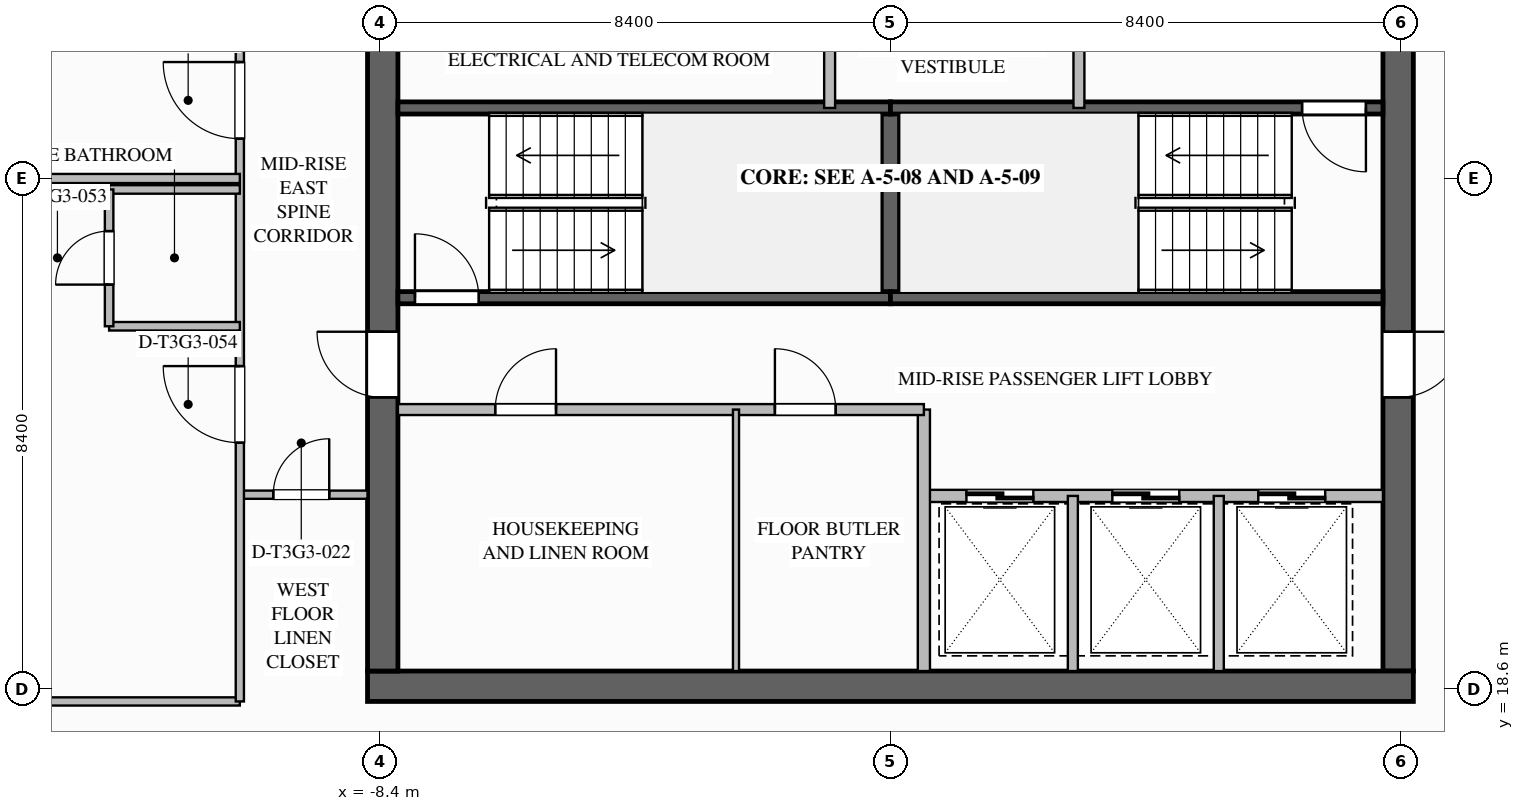
"""IFC4 building model, lengths in metres.
Left out: names, types, materials, properties, quantities, classifications, styles, units other than length and angle.
Written with IfcOpenShell. Run it as: python <this file> out.ifc"""

import sys

from ifc_helpers import new_model, si_unit, direction, frame, frame_2d, origin, place, context, subcontext, project, spatial, rectangle, extrude, element, fill, save


model = new_model("IFC4")
c1 = context("Model", 3, precision=1e-05, world=origin(), true_north=direction((0.0, 1.0)))
c2 = subcontext(c1, "Body", "Model", "MODEL_VIEW")
j1 = project(units=[si_unit("LENGTHUNIT", "METRE"), si_unit("PLANEANGLEUNIT", "RADIAN")], contexts=[c1])
p1 = place(None, origin())
s1 = spatial("IfcSite", under=j1, at=p1, CompositionType="ELEMENT")
p2 = place(p1, origin())
s2 = spatial("IfcBuilding", under=s1, at=p2, CompositionType="ELEMENT")
p3 = place(p2, frame((0.0, 0.0, 171.7)))
s3 = spatial("IfcBuildingStorey", under=s2, at=p3, CompositionType="ELEMENT", Elevation=171.7)
p4 = place(p3, frame((8.35, 35.1, 0.0), z_axis=(0.0, 0.0, 1.0), x_axis=(0.0, -1.0, 0.0)))
e1 = element("IfcWall", 1, at=p4, inside=s3, PredefinedType="SHEAR", context=c2, shape_type="SweptSolid", body=[
    extrude(rectangle(XDim=16.2, YDim=0.5, at=frame_2d((8.1, 0.0))), origin(), (0.0, 0.0, 1.0), 3.55),
])
p5 = place(p4, frame((3.08, 0.0, 0.0)))
e2 = element("IfcOpeningElement", 2, at=p5, cuts=e1, PredefinedType="OPENING", context=c2, shape_type="SweptSolid", body=[
    extrude(rectangle(XDim=1.12, YDim=2.1, at=frame_2d((0.56, 1.05))), frame((0.0, 0.26, 0.0), z_axis=(0.0, -1.0, 0.0), x_axis=(1.0, 0.0, 0.0)), (0.0, 0.0, 1.0), 0.52),
])
p6 = place(p4, frame((10.62, 0.0, 0.0)))
e3 = element("IfcOpeningElement", 3, at=p6, cuts=e1, PredefinedType="OPENING", context=c2, shape_type="SweptSolid", body=[
    extrude(rectangle(XDim=1.08, YDim=2.04, at=frame_2d((0.54, 1.02))), frame((0.0, 0.26, 0.0), z_axis=(0.0, -1.0, 0.0), x_axis=(1.0, 0.0, 0.0)), (0.0, 0.0, 1.0), 0.52),
])
p7 = place(p3, frame((8.6, 18.65, 0.0), z_axis=(0.0, 0.0, 1.0), x_axis=(-1.0, 0.0, 0.0)))
e4 = element("IfcWall", 4, at=p7, inside=s3, PredefinedType="SHEAR", context=c2, shape_type="SweptSolid", body=[
    extrude(rectangle(XDim=17.2, YDim=0.5, at=frame_2d((8.6, 0.0))), origin(), (0.0, 0.0, 1.0), 3.55),
])
p8 = place(p3, frame((-8.35, 18.9, 0.0), z_axis=(0.0, 0.0, 1.0), x_axis=(0.0, 1.0, 0.0)))
e5 = element("IfcWall", 5, at=p8, inside=s3, PredefinedType="SHEAR", context=c2, shape_type="SweptSolid", body=[
    extrude(rectangle(XDim=16.2, YDim=0.5, at=frame_2d((8.1, 0.0))), origin(), (0.0, 0.0, 1.0), 3.55),
])
p9 = place(p8, frame((12.02, 0.0, 0.0)))
e6 = element("IfcOpeningElement", 6, at=p9, cuts=e5, PredefinedType="OPENING", context=c2, shape_type="SweptSolid", body=[
    extrude(rectangle(XDim=1.08, YDim=2.04, at=frame_2d((0.54, 1.02))), frame((0.0, 0.26, 0.0), z_axis=(0.0, -1.0, 0.0), x_axis=(1.0, 0.0, 0.0)), (0.0, 0.0, 1.0), 0.52),
])
p10 = place(p8, frame((4.5, 0.0, 0.0)))
e7 = element("IfcOpeningElement", 7, at=p10, cuts=e5, PredefinedType="OPENING", context=c2, shape_type="SweptSolid", body=[
    extrude(rectangle(XDim=1.08, YDim=2.04, at=frame_2d((0.54, 1.02))), frame((0.0, 0.26, 0.0), z_axis=(0.0, -1.0, 0.0), x_axis=(1.0, 0.0, 0.0)), (0.0, 0.0, 1.0), 0.52),
])
p11 = place(p3, frame((0.0, 25.04, 0.0), z_axis=(0.0, 0.0, 1.0), x_axis=(0.0, 1.0, 0.0)))
e8 = element("IfcWall", 8, at=p11, inside=s3, PredefinedType="SOLIDWALL", context=c2, shape_type="SweptSolid", body=[
    extrude(rectangle(XDim=3.12, YDim=0.3, at=frame_2d((1.56, 0.0))), origin(), (0.0, 0.0, 1.0), 3.29),
])
p12 = place(p3, frame((-8.1, 25.04, 0.0), z_axis=(0.0, 0.0, 1.0), x_axis=(1.0, 0.0, 0.0)))
e9 = element("IfcWall", 9, at=p12, inside=s3, PredefinedType="SOLIDWALL", context=c2, shape_type="SweptSolid", body=[
    extrude(rectangle(XDim=8.1, YDim=0.2, at=frame_2d((4.05, 0.0))), origin(), (0.0, 0.0, 1.0), 3.29),
])
p13 = place(p12, frame((0.28, 0.0, 0.0)))
e10 = element("IfcOpeningElement", 10, at=p13, cuts=e9, PredefinedType="OPENING", context=c2, shape_type="SweptSolid", body=[
    extrude(rectangle(XDim=1.05, YDim=2.1, at=frame_2d((0.525, 1.05))), frame((0.0, 0.11, 0.0), z_axis=(0.0, -1.0, 0.0), x_axis=(1.0, 0.0, 0.0)), (0.0, 0.0, 1.0), 0.22),
])
for number, where, z_axis, x_axis in (
    (11, (-8.1, 28.16, 0.0), (0.0, 0.0, 1.0), (1.0, 0.0, 0.0)),
    (12, (0.0, 25.04, 0.0), (0.0, 0.0, 1.0), (1.0, 0.0, 0.0)),
):
    element("IfcWall", number, at=place(p3, frame(where, z_axis=z_axis, x_axis=x_axis)), inside=s3, PredefinedType="SOLIDWALL", context=c2, shape_type="SweptSolid", body=[
        extrude(rectangle(XDim=8.1, YDim=0.2, at=frame_2d((4.05, 0.0))), origin(), (0.0, 0.0, 1.0), 3.29),
    ])
p14 = place(p3, frame((8.1, 28.16, 0.0), z_axis=(0.0, 0.0, 1.0), x_axis=(-1.0, 0.0, 0.0)))
e13 = element("IfcWall", 13, at=p14, inside=s3, PredefinedType="SOLIDWALL", context=c2, shape_type="SweptSolid", body=[
    extrude(rectangle(XDim=8.1, YDim=0.2, at=frame_2d((4.05, 0.0))), origin(), (0.0, 0.0, 1.0), 3.29),
])
p15 = place(p14, frame((0.28, 0.0, 0.0)))
e14 = element("IfcOpeningElement", 14, at=p15, cuts=e13, PredefinedType="OPENING", context=c2, shape_type="SweptSolid", body=[
    extrude(rectangle(XDim=1.05, YDim=2.1, at=frame_2d((0.525, 1.05))), frame((0.0, 0.11, 0.0), z_axis=(0.0, -1.0, 0.0), x_axis=(1.0, 0.0, 0.0)), (0.0, 0.0, 1.0), 0.22),
])
p16 = place(p3, frame((3.1, 28.16, 0.0), z_axis=(0.0, 0.0, 1.0), x_axis=(0.0, 1.0, 0.0)))
e15 = element("IfcWall", 15, at=p16, inside=s3, PredefinedType="SOLIDWALL", context=c2, shape_type="SweptSolid", body=[
    extrude(rectangle(XDim=4.06, YDim=0.18, at=frame_2d((2.03, 0.0))), origin(), (0.0, 0.0, 1.0), 3.29),
])
p17 = place(p16, frame((1.4, 0.0, 0.0)))
e16 = element("IfcOpeningElement", 16, at=p17, cuts=e15, PredefinedType="OPENING", context=c2, shape_type="SweptSolid", body=[
    extrude(rectangle(XDim=1.12, YDim=2.1, at=frame_2d((0.56, 1.05))), frame((0.0, 0.1, 0.0), z_axis=(0.0, -1.0, 0.0), x_axis=(1.0, 0.0, 0.0)), (0.0, 0.0, 1.0), 0.2),
])
p18 = place(p3, frame((-1.0, 28.16, 0.0), z_axis=(0.0, 0.0, 1.0), x_axis=(0.0, 1.0, 0.0)))
e17 = element("IfcWall", 17, at=p18, inside=s3, PredefinedType="SOLIDWALL", context=c2, shape_type="SweptSolid", body=[
    extrude(rectangle(XDim=4.02, YDim=0.18, at=frame_2d((2.01, 0.0))), origin(), (0.0, 0.0, 1.0), 3.29),
])
p19 = place(p18, frame((2.49, 0.0, 0.0)))
e18 = element("IfcOpeningElement", 18, at=p19, cuts=e17, PredefinedType="OPENING", context=c2, shape_type="SweptSolid", body=[
    extrude(rectangle(XDim=1.0, YDim=2.1, at=frame_2d((0.5, 1.05))), frame((0.0, 0.1, 0.0), z_axis=(0.0, -1.0, 0.0), x_axis=(1.0, 0.0, 0.0)), (0.0, 0.0, 1.0), 0.2),
])
p20 = place(p3, frame((8.1, 21.78, 0.0), z_axis=(0.0, 0.0, 1.0), x_axis=(-1.0, 0.0, 0.0)))
e19 = element("IfcWall", 19, at=p20, inside=s3, PredefinedType="SOLIDWALL", context=c2, shape_type="SweptSolid", body=[
    extrude(rectangle(XDim=7.55, YDim=0.2, at=frame_2d((3.775, 0.0))), origin(), (0.0, 0.0, 1.0), 3.29),
])
p21 = place(p20, frame((5.75, 0.0, 0.0)))
e20 = element("IfcOpeningElement", 20, at=p21, cuts=e19, PredefinedType="OPENING", context=c2, shape_type="SweptSolid", body=[
    extrude(rectangle(XDim=1.1, YDim=2.2, at=frame_2d((0.55, 1.1))), frame((0.0, 0.11, 0.0), z_axis=(0.0, -1.0, 0.0), x_axis=(1.0, 0.0, 0.0)), (0.0, 0.0, 1.0), 0.22),
])
p22 = place(p20, frame((3.35, 0.0, 0.0)))
e21 = element("IfcOpeningElement", 21, at=p22, cuts=e19, PredefinedType="OPENING", context=c2, shape_type="SweptSolid", body=[
    extrude(rectangle(XDim=1.1, YDim=2.2, at=frame_2d((0.55, 1.1))), frame((0.0, 0.11, 0.0), z_axis=(0.0, -1.0, 0.0), x_axis=(1.0, 0.0, 0.0)), (0.0, 0.0, 1.0), 0.22),
])
p23 = place(p20, frame((0.95, 0.0, 0.0)))
e22 = element("IfcOpeningElement", 22, at=p23, cuts=e19, PredefinedType="OPENING", context=c2, shape_type="SweptSolid", body=[
    extrude(rectangle(XDim=1.1, YDim=2.2, at=frame_2d((0.55, 1.1))), frame((0.0, 0.11, 0.0), z_axis=(0.0, -1.0, 0.0), x_axis=(1.0, 0.0, 0.0)), (0.0, 0.0, 1.0), 0.22),
])
p24 = place(p3, frame((0.55, 18.9, 0.0), z_axis=(0.0, 0.0, 1.0), x_axis=(0.0, 1.0, 0.0)))
e23 = element("IfcWall", 23, at=p24, inside=s3, PredefinedType="SOLIDWALL", context=c2, shape_type="SweptSolid", body=[
    extrude(rectangle(XDim=4.3, YDim=0.2, at=frame_2d((2.15, 0.0))), origin(), (0.0, 0.0, 1.0), 3.29),
])
for number, where, z_axis, x_axis in (
    (24, (3.0, 18.9, 0.0), (0.0, 0.0, 1.0), (0.0, 1.0, 0.0)),
    (25, (5.4, 18.9, 0.0), (0.0, 0.0, 1.0), (0.0, 1.0, 0.0)),
):
    element("IfcWall", number, at=place(p3, frame(where, z_axis=z_axis, x_axis=x_axis)), inside=s3, PredefinedType="PARTITIONING", context=c2, shape_type="SweptSolid", body=[
        extrude(rectangle(XDim=2.88, YDim=0.165, at=frame_2d((1.44, 0.0))), origin(), (0.0, 0.0, 1.0), 3.29),
    ])
p25 = place(p3, frame((-8.1, 23.2, 0.0), z_axis=(0.0, 0.0, 1.0), x_axis=(1.0, 0.0, 0.0)))
e26 = element("IfcWall", 26, at=p25, inside=s3, PredefinedType="SOLIDWALL", context=c2, shape_type="SweptSolid", body=[
    extrude(rectangle(XDim=8.65, YDim=0.18, at=frame_2d((4.325, 0.0))), origin(), (0.0, 0.0, 1.0), 3.29),
])
p26 = place(p25, frame((1.6, 0.0, 0.0)))
e27 = element("IfcOpeningElement", 27, at=p26, cuts=e26, PredefinedType="OPENING", context=c2, shape_type="SweptSolid", body=[
    extrude(rectangle(XDim=1.0, YDim=2.1, at=frame_2d((0.5, 1.05))), frame((0.0, 0.1, 0.0), z_axis=(0.0, -1.0, 0.0), x_axis=(1.0, 0.0, 0.0)), (0.0, 0.0, 1.0), 0.2),
])
p27 = place(p25, frame((6.2, 0.0, 0.0)))
e28 = element("IfcOpeningElement", 28, at=p27, cuts=e26, PredefinedType="OPENING", context=c2, shape_type="SweptSolid", body=[
    extrude(rectangle(XDim=1.0, YDim=2.1, at=frame_2d((0.5, 1.05))), frame((0.0, 0.1, 0.0), z_axis=(0.0, -1.0, 0.0), x_axis=(1.0, 0.0, 0.0)), (0.0, 0.0, 1.0), 0.2),
])
p28 = place(p3, frame((-2.54, 18.9, 0.0), z_axis=(0.0, 0.0, 1.0), x_axis=(0.0, 1.0, 0.0)))
e29 = element("IfcWall", 29, at=p28, inside=s3, PredefinedType="PARTITIONING", context=c2, shape_type="SweptSolid", body=[
    extrude(rectangle(XDim=4.3, YDim=0.1, at=frame_2d((2.15, 0.0))), origin(), (0.0, 0.0, 1.0), 3.29),
])
p29 = place(p3, frame((-10.7, 21.8, 0.0), z_axis=(0.0, 0.0, 1.0), x_axis=(1.0, 0.0, 0.0)))
e30 = element("IfcWall", 30, at=p29, inside=s3, PredefinedType="PARTITIONING", context=c2, shape_type="SweptSolid", body=[
    extrude(rectangle(XDim=2.1, YDim=0.135, at=frame_2d((1.05, 0.0))), origin(), (0.0, 0.0, 1.0), 3.29),
])
p30 = place(p29, frame((0.55, 0.0, 0.0)))
e31 = element("IfcOpeningElement", 31, at=p30, cuts=e30, PredefinedType="OPENING", context=c2, shape_type="SweptSolid", body=[
    extrude(rectangle(XDim=0.92, YDim=2.1, at=frame_2d((0.46, 1.05))), frame((0.0, 0.077, 0.0), z_axis=(0.0, -1.0, 0.0), x_axis=(1.0, 0.0, 0.0)), (0.0, 0.0, 1.0), 0.155),
])
p31 = place(p3, frame((-16.2, 18.4, 0.0), z_axis=(0.0, 0.0, 1.0), x_axis=(1.0, 0.0, 0.0)))
e32 = element("IfcWall", 32, at=p31, inside=s3, PredefinedType="PARTITIONING", context=c2, shape_type="SweptSolid", body=[
    extrude(rectangle(XDim=5.5, YDim=0.135, at=frame_2d((2.75, 0.0))), origin(), (0.0, 0.0, 1.0), 2.667),
])
p32 = place(p3, frame((-10.7, 18.4, 0.0), z_axis=(0.0, 0.0, 1.0), x_axis=(0.0, 1.0, 0.0)))
e33 = element("IfcWall", 33, at=p32, inside=s3, PredefinedType="PARTITIONING", context=c2, shape_type="SweptSolid", body=[
    extrude(rectangle(XDim=17.2, YDim=0.135, at=frame_2d((8.6, 0.0))), origin(), (0.0, 0.0, 1.0), 3.29),
])
p33 = place(p32, frame((4.255, 0.0, 0.0)))
e34 = element("IfcOpeningElement", 34, at=p33, cuts=e33, PredefinedType="OPENING", context=c2, shape_type="SweptSolid", body=[
    extrude(rectangle(XDim=1.26, YDim=2.2, at=frame_2d((0.63, 1.1))), frame((0.0, 0.077, 0.0), z_axis=(0.0, -1.0, 0.0), x_axis=(1.0, 0.0, 0.0)), (0.0, 0.0, 1.0), 0.155),
])
p34 = place(p32, frame((9.255, 0.0, 0.0)))
e35 = element("IfcOpeningElement", 35, at=p34, cuts=e33, PredefinedType="OPENING", context=c2, shape_type="SweptSolid", body=[
    extrude(rectangle(XDim=1.26, YDim=2.2, at=frame_2d((0.63, 1.1))), frame((0.0, 0.077, 0.0), z_axis=(0.0, -1.0, 0.0), x_axis=(1.0, 0.0, 0.0)), (0.0, 0.0, 1.0), 0.155),
])
p35 = place(p3, frame((-26.2, 27.0, 0.0), z_axis=(0.0, 0.0, 1.0), x_axis=(1.0, 0.0, 0.0)))
e36 = element("IfcWall", 36, at=p35, inside=s3, PredefinedType="PARTITIONING", context=c2, shape_type="SweptSolid", body=[
    extrude(rectangle(XDim=15.5, YDim=0.15, at=frame_2d((7.75, 0.0))), origin(), (0.0, 0.0, 1.0), 2.58),
])
p36 = place(p3, frame((-10.7, 24.57, 0.0), z_axis=(0.0, 0.0, 1.0), x_axis=(-1.0, 0.0, 0.0)))
e37 = element("IfcWall", 37, at=p36, inside=s3, PredefinedType="PLUMBINGWALL", context=c2, shape_type="SweptSolid", body=[
    extrude(rectangle(XDim=2.15, YDim=0.14, at=frame_2d((1.075, 0.0))), origin(), (0.0, 0.0, 1.0), 3.29),
])
p37 = place(p3, frame((-10.7, 26.82, 0.0), z_axis=(0.0, 0.0, 1.0), x_axis=(-1.0, 0.0, 0.0)))
e38 = element("IfcWall", 38, at=p37, inside=s3, PredefinedType="PLUMBINGWALL", context=c2, shape_type="SweptSolid", body=[
    extrude(rectangle(XDim=2.15, YDim=0.14, at=frame_2d((1.075, 0.0))), origin(), (0.0, 0.0, 1.0), 2.667),
])
p38 = place(p3, frame((-12.85, 24.57, 0.0), z_axis=(0.0, 0.0, 1.0), x_axis=(0.0, 1.0, 0.0)))
e39 = element("IfcWall", 39, at=p38, inside=s3, PredefinedType="PLUMBINGWALL", context=c2, shape_type="SweptSolid", body=[
    extrude(rectangle(XDim=2.25, YDim=0.14, at=frame_2d((1.125, 0.0))), origin(), (0.0, 0.0, 1.0), 3.29),
])
p39 = place(p38, frame((0.685, 0.0, 0.0)))
e40 = element("IfcOpeningElement", 40, at=p39, cuts=e39, PredefinedType="OPENING", context=c2, shape_type="SweptSolid", body=[
    extrude(rectangle(XDim=0.88, YDim=2.1, at=frame_2d((0.44, 1.05))), frame((0.0, 0.08, 0.0), z_axis=(0.0, -1.0, 0.0), x_axis=(1.0, 0.0, 0.0)), (0.0, 0.0, 1.0), 0.16),
])
p40 = place(p13, origin())
e41 = element("IfcDoor", 41, at=p40, inside=s3, OperationType="SINGLE_SWING_LEFT", PredefinedType="DOOR", context=c2, shape_type="SweptSolid", body=[
    extrude(rectangle(XDim=1.05, YDim=2.1, at=frame_2d((0.525, 1.05))), frame((0.0, 0.025, 0.0), z_axis=(0.0, -1.0, 0.0), x_axis=(1.0, 0.0, 0.0)), (0.0, 0.0, 1.0), 0.05),
])
fill(e10, e41)
p41 = place(p15, origin())
e42 = element("IfcDoor", 42, at=p41, inside=s3, OperationType="SINGLE_SWING_LEFT", PredefinedType="DOOR", context=c2, shape_type="SweptSolid", body=[
    extrude(rectangle(XDim=1.05, YDim=2.1, at=frame_2d((0.525, 1.05))), frame((0.0, 0.025, 0.0), z_axis=(0.0, -1.0, 0.0), x_axis=(1.0, 0.0, 0.0)), (0.0, 0.0, 1.0), 0.05),
])
fill(e14, e42)
p42 = place(p21, origin())
e43 = element("IfcDoor", 43, at=p42, inside=s3, OperationType="SLIDING_TO_LEFT", PredefinedType="DOOR", context=c2, shape_type="SweptSolid", body=[
    extrude(rectangle(XDim=1.1, YDim=2.2, at=frame_2d((0.55, 1.1))), frame((0.0, 0.025, 0.0), z_axis=(0.0, -1.0, 0.0), x_axis=(1.0, 0.0, 0.0)), (0.0, 0.0, 1.0), 0.05),
])
fill(e20, e43)
p43 = place(p22, origin())
e44 = element("IfcDoor", 44, at=p43, inside=s3, OperationType="SLIDING_TO_LEFT", PredefinedType="DOOR", context=c2, shape_type="SweptSolid", body=[
    extrude(rectangle(XDim=1.1, YDim=2.2, at=frame_2d((0.55, 1.1))), frame((0.0, 0.025, 0.0), z_axis=(0.0, -1.0, 0.0), x_axis=(1.0, 0.0, 0.0)), (0.0, 0.0, 1.0), 0.05),
])
fill(e21, e44)
p44 = place(p23, origin())
e45 = element("IfcDoor", 45, at=p44, inside=s3, OperationType="SLIDING_TO_LEFT", PredefinedType="DOOR", context=c2, shape_type="SweptSolid", body=[
    extrude(rectangle(XDim=1.1, YDim=2.2, at=frame_2d((0.55, 1.1))), frame((0.0, 0.025, 0.0), z_axis=(0.0, -1.0, 0.0), x_axis=(1.0, 0.0, 0.0)), (0.0, 0.0, 1.0), 0.05),
])
fill(e22, e45)
p45 = place(p10, origin())
e46 = element("IfcDoor", 46, at=p45, inside=s3, OperationType="SINGLE_SWING_RIGHT", PredefinedType="DOOR", context=c2, shape_type="SweptSolid", body=[
    extrude(rectangle(XDim=1.08, YDim=2.04, at=frame_2d((0.54, 1.02))), frame((0.0, 0.025, 0.0), z_axis=(0.0, -1.0, 0.0), x_axis=(1.0, 0.0, 0.0)), (0.0, 0.0, 1.0), 0.05),
])
fill(e7, e46)
p46 = place(p6, origin())
e47 = element("IfcDoor", 47, at=p46, inside=s3, OperationType="SINGLE_SWING_LEFT", PredefinedType="DOOR", context=c2, shape_type="SweptSolid", body=[
    extrude(rectangle(XDim=1.08, YDim=2.04, at=frame_2d((0.54, 1.02))), frame((0.0, 0.025, 0.0), z_axis=(0.0, -1.0, 0.0), x_axis=(1.0, 0.0, 0.0)), (0.0, 0.0, 1.0), 0.05),
])
fill(e3, e47)
p47 = place(p26, origin())
e48 = element("IfcDoor", 48, at=p47, inside=s3, OperationType="SINGLE_SWING_RIGHT", PredefinedType="DOOR", context=c2, shape_type="SweptSolid", body=[
    extrude(rectangle(XDim=1.0, YDim=2.1, at=frame_2d((0.5, 1.05))), frame((0.0, 0.025, 0.0), z_axis=(0.0, -1.0, 0.0), x_axis=(1.0, 0.0, 0.0)), (0.0, 0.0, 1.0), 0.05),
])
fill(e27, e48)
p48 = place(p27, origin())
e49 = element("IfcDoor", 49, at=p48, inside=s3, OperationType="SINGLE_SWING_LEFT", PredefinedType="DOOR", context=c2, shape_type="SweptSolid", body=[
    extrude(rectangle(XDim=1.0, YDim=2.1, at=frame_2d((0.5, 1.05))), frame((0.0, 0.025, 0.0), z_axis=(0.0, -1.0, 0.0), x_axis=(1.0, 0.0, 0.0)), (0.0, 0.0, 1.0), 0.05),
])
fill(e28, e49)
p49 = place(p30, origin())
e50 = element("IfcDoor", 50, at=p49, inside=s3, OperationType="SINGLE_SWING_RIGHT", PredefinedType="DOOR", context=c2, shape_type="SweptSolid", body=[
    extrude(rectangle(XDim=0.92, YDim=2.1, at=frame_2d((0.46, 1.05))), frame((0.0, 0.025, 0.0), z_axis=(0.0, -1.0, 0.0), x_axis=(1.0, 0.0, 0.0)), (0.0, 0.0, 1.0), 0.05),
])
fill(e31, e50)
p50 = place(p39, origin())
e51 = element("IfcDoor", 51, at=p50, inside=s3, OperationType="SINGLE_SWING_LEFT", PredefinedType="DOOR", context=c2, shape_type="SweptSolid", body=[
    extrude(rectangle(XDim=0.88, YDim=2.1, at=frame_2d((0.44, 1.05))), frame((0.0, 0.025, 0.0), z_axis=(0.0, -1.0, 0.0), x_axis=(1.0, 0.0, 0.0)), (0.0, 0.0, 1.0), 0.05),
])
fill(e40, e51)
p51 = place(p33, origin())
e52 = element("IfcDoor", 52, at=p51, inside=s3, OperationType="SINGLE_SWING_RIGHT", PredefinedType="DOOR", context=c2, shape_type="SweptSolid", body=[
    extrude(rectangle(XDim=1.26, YDim=2.2, at=frame_2d((0.63, 1.1))), frame((0.0, 0.025, 0.0), z_axis=(0.0, -1.0, 0.0), x_axis=(1.0, 0.0, 0.0)), (0.0, 0.0, 1.0), 0.05),
])
fill(e34, e52)
p52 = place(p34, origin())
e53 = element("IfcDoor", 53, at=p52, inside=s3, OperationType="SINGLE_SWING_RIGHT", PredefinedType="DOOR", context=c2, shape_type="SweptSolid", body=[
    extrude(rectangle(XDim=1.26, YDim=2.2, at=frame_2d((0.63, 1.1))), frame((0.0, 0.025, 0.0), z_axis=(0.0, -1.0, 0.0), x_axis=(1.0, 0.0, 0.0)), (0.0, 0.0, 1.0), 0.05),
])
fill(e35, e53)
save(model, sys.argv[1])
